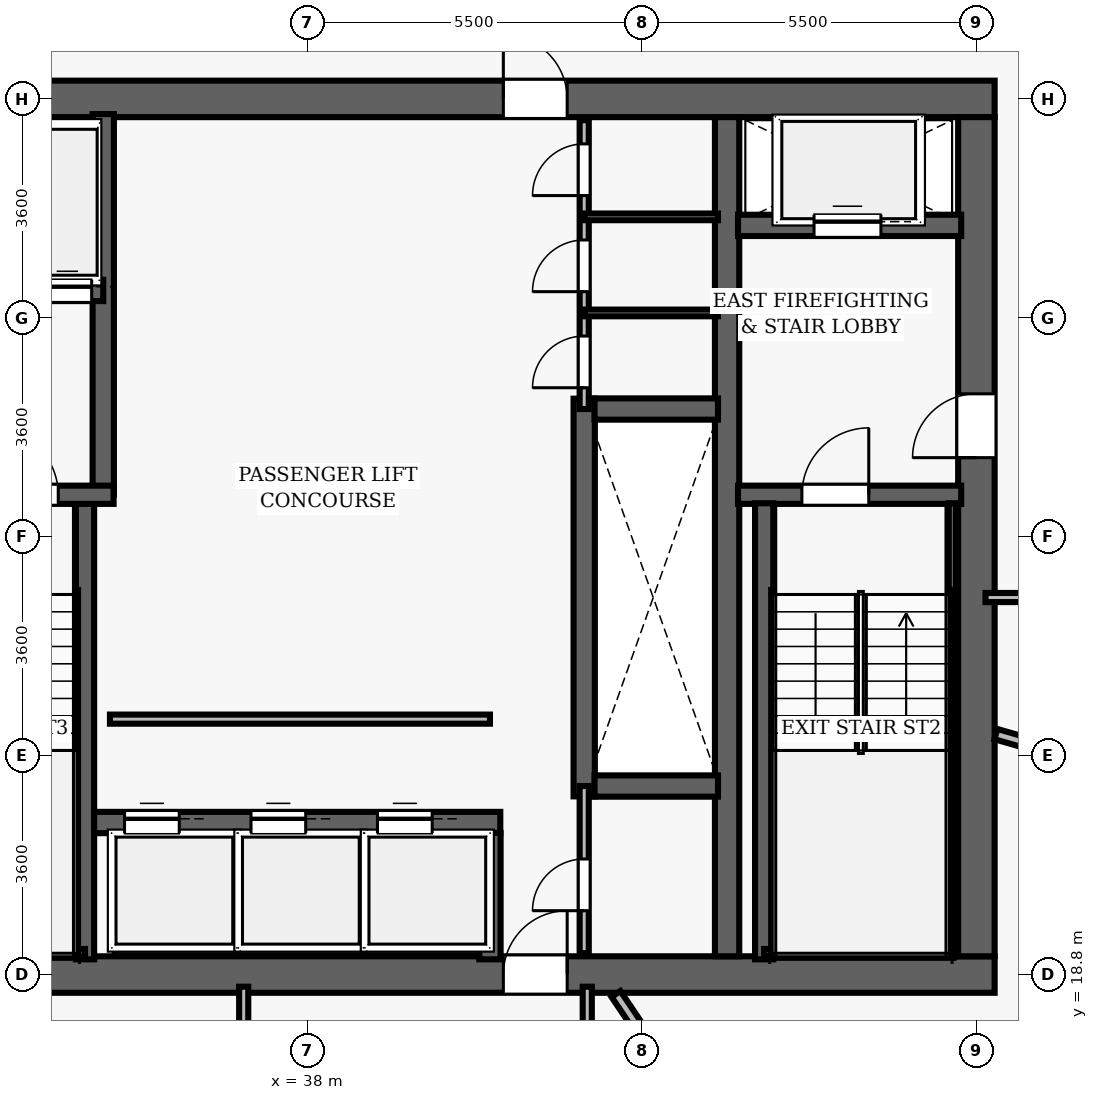
"""IFC4 building model, lengths in metres.
Left out: names, types, materials, properties, quantities, classifications, styles, units other than length and angle.
Written with IfcOpenShell. Run it as: python <this file> out.ifc"""

import sys

from ifc_helpers import new_model, si_unit, direction, frame, frame_2d, origin, place, context, subcontext, project, spatial, rectangle, extrude, element, fill, save


model = new_model("IFC4")
c1 = context("Model", 3, precision=1e-05, world=origin(), true_north=direction((0.0, 1.0)))
c2 = subcontext(c1, "Body", "Model", "MODEL_VIEW")
j1 = project(units=[si_unit("LENGTHUNIT", "METRE"), si_unit("PLANEANGLEUNIT", "RADIAN")], contexts=[c1])
p1 = place(None, origin())
s1 = spatial("IfcSite", under=j1, at=p1, CompositionType="ELEMENT")
p2 = place(p1, origin())
s2 = spatial("IfcBuilding", under=s1, at=p2, CompositionType="ELEMENT")
p3 = place(p2, frame((0.0, 0.0, 141.3)))
s3 = spatial("IfcBuildingStorey", under=s2, at=p3, CompositionType="ELEMENT", Elevation=141.3)
p4 = place(p3, frame((26.7, 18.8, 0.0), z_axis=(0.0, 0.0, 1.0), x_axis=(1.0, 0.0, 0.0)))
e1 = element("IfcWall", 1, at=p4, inside=s3, PredefinedType="SHEAR", context=c2, shape_type="SweptSolid", body=[
    extrude(rectangle(XDim=22.6, YDim=0.6, at=frame_2d((11.3, 0.0))), origin(), (0.0, 0.0, 1.0), 3.5),
])
p5 = place(p4, frame((14.52, 0.0, 0.0)))
e2 = element("IfcOpeningElement", 2, at=p5, cuts=e1, PredefinedType="OPENING", context=c2, shape_type="SweptSolid", body=[
    extrude(rectangle(XDim=1.05, YDim=2.15, at=frame_2d((0.525, 1.075))), frame((0.0, 0.31, 0.0), z_axis=(0.0, -1.0, 0.0), x_axis=(1.0, 0.0, 0.0)), (0.0, 0.0, 1.0), 0.62),
])
p6 = place(p3, frame((26.7, 33.2, 0.0), z_axis=(0.0, 0.0, 1.0), x_axis=(1.0, 0.0, 0.0)))
e3 = element("IfcWall", 3, at=p6, inside=s3, PredefinedType="SHEAR", context=c2, shape_type="SweptSolid", body=[
    extrude(rectangle(XDim=22.6, YDim=0.6, at=frame_2d((11.3, 0.0))), origin(), (0.0, 0.0, 1.0), 3.5),
])
p7 = place(p6, frame((4.62, 0.0, 0.0)))
e4 = element("IfcOpeningElement", 4, at=p7, cuts=e3, PredefinedType="OPENING", context=c2, shape_type="SweptSolid", body=[
    extrude(rectangle(XDim=1.05, YDim=2.15, at=frame_2d((0.525, 1.075))), frame((0.0, 0.31, 0.0), z_axis=(0.0, -1.0, 0.0), x_axis=(1.0, 0.0, 0.0)), (0.0, 0.0, 1.0), 0.62),
])
p8 = place(p6, frame((14.52, 0.0, 0.0)))
e5 = element("IfcOpeningElement", 5, at=p8, cuts=e3, PredefinedType="OPENING", context=c2, shape_type="SweptSolid", body=[
    extrude(rectangle(XDim=1.05, YDim=2.15, at=frame_2d((0.525, 1.075))), frame((0.0, 0.31, 0.0), z_axis=(0.0, -1.0, 0.0), x_axis=(1.0, 0.0, 0.0)), (0.0, 0.0, 1.0), 0.62),
])
p9 = place(p3, frame((49.0, 19.1, 0.0), z_axis=(0.0, 0.0, 1.0), x_axis=(0.0, 1.0, 0.0)))
e6 = element("IfcWall", 6, at=p9, inside=s3, PredefinedType="SHEAR", context=c2, shape_type="SweptSolid", body=[
    extrude(rectangle(XDim=13.8, YDim=0.6, at=frame_2d((6.9, 0.0))), origin(), (0.0, 0.0, 1.0), 3.5),
])
p10 = place(p9, frame((8.2, 0.0, 0.0)))
e7 = element("IfcOpeningElement", 7, at=p10, cuts=e6, PredefinedType="OPENING", context=c2, shape_type="SweptSolid", body=[
    extrude(rectangle(XDim=1.05, YDim=2.15, at=frame_2d((0.525, 1.075))), frame((0.0, 0.31, 0.0), z_axis=(0.0, -1.0, 0.0), x_axis=(1.0, 0.0, 0.0)), (0.0, 0.0, 1.0), 0.62),
])
p11 = place(p3, frame((44.9, 19.1, 0.0), z_axis=(0.0, 0.0, 1.0), x_axis=(0.0, 1.0, 0.0)))
e8 = element("IfcWall", 8, at=p11, inside=s3, PredefinedType="SHEAR", context=c2, shape_type="SweptSolid", body=[
    extrude(rectangle(XDim=13.8, YDim=0.4, at=frame_2d((6.9, 0.0))), origin(), (0.0, 0.0, 1.0), 3.5),
])
p12 = place(p3, frame((45.08, 26.69, 0.0), z_axis=(0.0, 0.0, 1.0), x_axis=(1.0, 0.0, 0.0)))
e9 = element("IfcWall", 9, at=p12, inside=s3, PredefinedType="SHEAR", context=c2, shape_type="SweptSolid", body=[
    extrude(rectangle(XDim=3.67, YDim=0.3, at=frame_2d((1.835, 0.0))), origin(), (0.0, 0.0, 1.0), 3.5),
])
p13 = place(p12, frame((1.05, 0.0, 0.0)))
e10 = element("IfcOpeningElement", 10, at=p13, cuts=e9, PredefinedType="OPENING", context=c2, shape_type="SweptSolid", body=[
    extrude(rectangle(XDim=1.1, YDim=2.15, at=frame_2d((0.55, 1.075))), frame((0.0, 0.16, 0.0), z_axis=(0.0, -1.0, 0.0), x_axis=(1.0, 0.0, 0.0)), (0.0, 0.0, 1.0), 0.32),
])
p14 = place(p3, frame((45.51, 19.05, 0.0), z_axis=(0.0, 0.0, 1.0), x_axis=(0.0, 1.0, 0.0)))
e11 = element("IfcWall", 11, at=p14, inside=s3, PredefinedType="SHEAR", context=c2, shape_type="SweptSolid", body=[
    extrude(rectangle(XDim=7.5, YDim=0.3, at=frame_2d((3.75, 0.0))), origin(), (0.0, 0.0, 1.0), 3.5),
])
p15 = place(p3, frame((48.605, 19.1, 0.0), z_axis=(0.0, 0.0, 1.0), x_axis=(0.0, 1.0, 0.0)))
e12 = element("IfcWall", 12, at=p15, inside=s3, PredefinedType="SHEAR", context=c2, shape_type="SweptSolid", body=[
    extrude(rectangle(XDim=7.45, YDim=0.12, at=frame_2d((3.725, 0.0))), origin(), (0.0, 0.0, 1.0), 3.5),
])
p16 = place(p3, frame((45.51, 19.16, 0.0), z_axis=(0.0, 0.0, 1.0), x_axis=(1.0, 0.0, 0.0)))
e13 = element("IfcWall", 13, at=p16, inside=s3, PredefinedType="SHEAR", context=c2, shape_type="SweptSolid", body=[
    extrude(rectangle(XDim=3.095, YDim=0.12, at=frame_2d((1.547, 0.0))), origin(), (0.0, 0.0, 1.0), 3.5),
])
p17 = place(p3, frame((45.08, 31.12, 0.0), z_axis=(0.0, 0.0, 1.0), x_axis=(1.0, 0.0, 0.0)))
e14 = element("IfcWall", 14, at=p17, inside=s3, PredefinedType="SHEAR", context=c2, shape_type="SweptSolid", body=[
    extrude(rectangle(XDim=3.67, YDim=0.35, at=frame_2d((1.835, 0.0))), origin(), (0.0, 0.0, 1.0), 2.675),
])
p18 = place(p17, frame((1.25, 0.0, 0.0)))
e15 = element("IfcOpeningElement", 15, at=p18, cuts=e14, PredefinedType="OPENING", context=c2, shape_type="SweptSolid", body=[
    extrude(rectangle(XDim=1.1, YDim=2.15, at=frame_2d((0.55, 1.075))), frame((0.0, 0.185, 0.0), z_axis=(0.0, -1.0, 0.0), x_axis=(1.0, 0.0, 0.0)), (0.0, 0.0, 1.0), 0.37),
])
p19 = place(p3, frame((34.34, 19.05, 0.0), z_axis=(0.0, 0.0, 1.0), x_axis=(0.0, 1.0, 0.0)))
e16 = element("IfcWall", 16, at=p19, inside=s3, PredefinedType="SHEAR", context=c2, shape_type="SweptSolid", body=[
    extrude(rectangle(XDim=7.5, YDim=0.3, at=frame_2d((3.75, 0.0))), origin(), (0.0, 0.0, 1.0), 3.5),
])
p20 = place(p3, frame((34.64, 26.69, 0.0), z_axis=(0.0, 0.0, 1.0), x_axis=(0.0, 1.0, 0.0)))
e17 = element("IfcWall", 17, at=p20, inside=s3, PredefinedType="SHEAR", context=c2, shape_type="SweptSolid", body=[
    extrude(rectangle(XDim=6.26, YDim=0.35, at=frame_2d((3.13, 0.0))), origin(), (0.0, 0.0, 1.0), 3.5),
])
p21 = place(p3, frame((31.25, 26.69, 0.0), z_axis=(0.0, 0.0, 1.0), x_axis=(1.0, 0.0, 0.0)))
e18 = element("IfcWall", 18, at=p21, inside=s3, PredefinedType="SHEAR", context=c2, shape_type="SweptSolid", body=[
    extrude(rectangle(XDim=3.56, YDim=0.3, at=frame_2d((1.78, 0.0))), origin(), (0.0, 0.0, 1.0), 3.5),
])
p22 = place(p21, frame((1.55, 0.0, 0.0)))
e19 = element("IfcOpeningElement", 19, at=p22, cuts=e18, PredefinedType="OPENING", context=c2, shape_type="SweptSolid", body=[
    extrude(rectangle(XDim=1.1, YDim=2.15, at=frame_2d((0.55, 1.075))), frame((0.0, 0.16, 0.0), z_axis=(0.0, -1.0, 0.0), x_axis=(1.0, 0.0, 0.0)), (0.0, 0.0, 1.0), 0.32),
])
p23 = place(p3, frame((31.3, 19.16, 0.0), z_axis=(0.0, 0.0, 1.0), x_axis=(1.0, 0.0, 0.0)))
e20 = element("IfcWall", 20, at=p23, inside=s3, PredefinedType="SHEAR", context=c2, shape_type="SweptSolid", body=[
    extrude(rectangle(XDim=3.04, YDim=0.12, at=frame_2d((1.52, 0.0))), origin(), (0.0, 0.0, 1.0), 3.5),
])
p24 = place(p3, frame((32.23, 30.05, 0.0), z_axis=(0.0, 0.0, 1.0), x_axis=(1.0, 0.0, 0.0)))
e21 = element("IfcWall", 21, at=p24, inside=s3, PredefinedType="SHEAR", context=c2, shape_type="SweptSolid", body=[
    extrude(rectangle(XDim=2.41, YDim=0.35, at=frame_2d((1.205, 0.0))), origin(), (0.0, 0.0, 1.0), 2.675),
])
p25 = place(p24, frame((0.42, 0.0, 0.0)))
e22 = element("IfcOpeningElement", 22, at=p25, cuts=e21, PredefinedType="OPENING", context=c2, shape_type="SweptSolid", body=[
    extrude(rectangle(XDim=0.8, YDim=2.15, at=frame_2d((0.4, 1.075))), frame((0.0, 0.185, 0.0), z_axis=(0.0, -1.0, 0.0), x_axis=(1.0, 0.0, 0.0)), (0.0, 0.0, 1.0), 0.37),
])
p26 = place(p24, frame((1.42, 0.0, 0.0)))
e23 = element("IfcOpeningElement", 23, at=p26, cuts=e21, PredefinedType="OPENING", context=c2, shape_type="SweptSolid", body=[
    extrude(rectangle(XDim=0.8, YDim=2.15, at=frame_2d((0.4, 1.075))), frame((0.0, 0.185, 0.0), z_axis=(0.0, -1.0, 0.0), x_axis=(1.0, 0.0, 0.0)), (0.0, 0.0, 1.0), 0.37),
])
p27 = place(p3, frame((42.55, 21.73, 0.0), z_axis=(0.0, 0.0, 1.0), x_axis=(0.0, 1.0, 0.0)))
e24 = element("IfcWall", 24, at=p27, inside=s3, PredefinedType="SHEAR", context=c2, shape_type="SweptSolid", body=[
    extrude(rectangle(XDim=6.54, YDim=0.35, at=frame_2d((3.27, 0.0))), origin(), (0.0, 0.0, 1.0), 2.675),
])
for number, where, z_axis, x_axis in (
    (25, (42.72, 21.9, 0.0), (0.0, 0.0, 1.0), (1.0, 0.0, 0.0)),
    (26, (42.72, 28.1, 0.0), (0.0, 0.0, 1.0), (1.0, 0.0, 0.0)),
):
    element("IfcWall", number, at=place(p3, frame(where, z_axis=z_axis, x_axis=x_axis)), inside=s3, PredefinedType="SHEAR", context=c2, shape_type="SweptSolid", body=[
        extrude(rectangle(XDim=2.03, YDim=0.35, at=frame_2d((1.015, 0.0))), origin(), (0.0, 0.0, 1.0), 2.675),
    ])
p28 = place(p3, frame((34.49, 21.3, 0.0), z_axis=(0.0, 0.0, 1.0), x_axis=(1.0, 0.0, 0.0)))
e27 = element("IfcWall", 27, at=p28, inside=s3, PredefinedType="SHEAR", context=c2, shape_type="SweptSolid", body=[
    extrude(rectangle(XDim=6.68, YDim=0.35, at=frame_2d((3.34, 0.0))), origin(), (0.0, 0.0, 1.0), 2.675),
])
p29 = place(p28, frame((0.5, 0.0, 0.0)))
e28 = element("IfcOpeningElement", 28, at=p29, cuts=e27, PredefinedType="OPENING", context=c2, shape_type="SweptSolid", body=[
    extrude(rectangle(XDim=0.9, YDim=2.15, at=frame_2d((0.45, 1.075))), frame((0.0, 0.185, 0.0), z_axis=(0.0, -1.0, 0.0), x_axis=(1.0, 0.0, 0.0)), (0.0, 0.0, 1.0), 0.37),
])
p30 = place(p28, frame((2.58, 0.0, 0.0)))
e29 = element("IfcOpeningElement", 29, at=p30, cuts=e27, PredefinedType="OPENING", context=c2, shape_type="SweptSolid", body=[
    extrude(rectangle(XDim=0.9, YDim=2.15, at=frame_2d((0.45, 1.075))), frame((0.0, 0.185, 0.0), z_axis=(0.0, -1.0, 0.0), x_axis=(1.0, 0.0, 0.0)), (0.0, 0.0, 1.0), 0.37),
])
p31 = place(p28, frame((4.66, 0.0, 0.0)))
e30 = element("IfcOpeningElement", 30, at=p31, cuts=e27, PredefinedType="OPENING", context=c2, shape_type="SweptSolid", body=[
    extrude(rectangle(XDim=0.9, YDim=2.15, at=frame_2d((0.45, 1.075))), frame((0.0, 0.185, 0.0), z_axis=(0.0, -1.0, 0.0), x_axis=(1.0, 0.0, 0.0)), (0.0, 0.0, 1.0), 0.37),
])
p32 = place(p3, frame((41.0, 19.05, 0.0), z_axis=(0.0, 0.0, 1.0), x_axis=(0.0, 1.0, 0.0)))
e31 = element("IfcWall", 31, at=p32, inside=s3, PredefinedType="SHEAR", context=c2, shape_type="SweptSolid", body=[
    extrude(rectangle(XDim=2.08, YDim=0.35, at=frame_2d((1.04, 0.0))), origin(), (0.0, 0.0, 1.0), 2.675),
])
p33 = place(p3, frame((34.75, 23.0, 0.0), z_axis=(0.0, 0.0, 1.0), x_axis=(1.0, 0.0, 0.0)))
e32 = element("IfcWall", 32, at=p33, inside=s3, PredefinedType="PARTITIONING", context=c2, shape_type="SweptSolid", body=[
    extrude(rectangle(XDim=6.25, YDim=0.15, at=frame_2d((3.125, 0.0))), origin(), (0.0, 0.0, 1.0), 2.675),
])
p34 = place(p3, frame((42.55, 28.1, 0.0), z_axis=(0.0, 0.0, 1.0), x_axis=(0.0, 1.0, 0.0)))
e33 = element("IfcWall", 33, at=p34, inside=s3, PredefinedType="PARTITIONING", context=c2, shape_type="SweptSolid", body=[
    extrude(rectangle(XDim=4.75, YDim=0.15, at=frame_2d((2.375, 0.0))), origin(), (0.0, 0.0, 1.0), 2.675),
])
p35 = place(p34, frame((0.35, 0.0, 0.0)))
e34 = element("IfcOpeningElement", 34, at=p35, cuts=e33, PredefinedType="OPENING", context=c2, shape_type="SweptSolid", body=[
    extrude(rectangle(XDim=0.85, YDim=2.1, at=frame_2d((0.425, 1.05))), frame((0.0, 0.085, 0.0), z_axis=(0.0, -1.0, 0.0), x_axis=(1.0, 0.0, 0.0)), (0.0, 0.0, 1.0), 0.17),
])
p36 = place(p34, frame((1.93, 0.0, 0.0)))
e35 = element("IfcOpeningElement", 35, at=p36, cuts=e33, PredefinedType="OPENING", context=c2, shape_type="SweptSolid", body=[
    extrude(rectangle(XDim=0.85, YDim=2.1, at=frame_2d((0.425, 1.05))), frame((0.0, 0.085, 0.0), z_axis=(0.0, -1.0, 0.0), x_axis=(1.0, 0.0, 0.0)), (0.0, 0.0, 1.0), 0.17),
])
p37 = place(p34, frame((3.51, 0.0, 0.0)))
e36 = element("IfcOpeningElement", 36, at=p37, cuts=e33, PredefinedType="OPENING", context=c2, shape_type="SweptSolid", body=[
    extrude(rectangle(XDim=0.85, YDim=2.1, at=frame_2d((0.425, 1.05))), frame((0.0, 0.085, 0.0), z_axis=(0.0, -1.0, 0.0), x_axis=(1.0, 0.0, 0.0)), (0.0, 0.0, 1.0), 0.17),
])
for number, where, z_axis, x_axis in (
    (37, (42.55, 29.68, 0.0), (0.0, 0.0, 1.0), (1.0, 0.0, 0.0)),
    (38, (42.55, 31.26, 0.0), (0.0, 0.0, 1.0), (1.0, 0.0, 0.0)),
):
    element("IfcWall", number, at=place(p3, frame(where, z_axis=z_axis, x_axis=x_axis)), inside=s3, PredefinedType="PARTITIONING", context=c2, shape_type="SweptSolid", body=[
        extrude(rectangle(XDim=2.2, YDim=0.11, at=frame_2d((1.1, 0.0))), origin(), (0.0, 0.0, 1.0), 2.675),
    ])
p38 = place(p3, frame((42.55, 19.15, 0.0), z_axis=(0.0, 0.0, 1.0), x_axis=(0.0, 1.0, 0.0)))
e39 = element("IfcWall", 39, at=p38, inside=s3, PredefinedType="PARTITIONING", context=c2, shape_type="SweptSolid", body=[
    extrude(rectangle(XDim=2.75, YDim=0.15, at=frame_2d((1.375, 0.0))), origin(), (0.0, 0.0, 1.0), 2.675),
])
p39 = place(p38, frame((0.7, 0.0, 0.0)))
e40 = element("IfcOpeningElement", 40, at=p39, cuts=e39, PredefinedType="OPENING", context=c2, shape_type="SweptSolid", body=[
    extrude(rectangle(XDim=0.85, YDim=2.1, at=frame_2d((0.425, 1.05))), frame((0.0, 0.085, 0.0), z_axis=(0.0, -1.0, 0.0), x_axis=(1.0, 0.0, 0.0)), (0.0, 0.0, 1.0), 0.17),
])
p40 = place(p3, frame((49.15, 25.0, 0.0), z_axis=(0.0, 0.0, 1.0), x_axis=(1.0, 0.0, 0.0)))
e41 = element("IfcWall", 41, at=p40, inside=s3, PredefinedType="PARTITIONING", context=c2, shape_type="SweptSolid", body=[
    extrude(rectangle(XDim=12.35, YDim=0.15, at=frame_2d((6.175, 0.0))), origin(), (0.0, 0.0, 1.0), 2.675),
])
p41 = place(p40, frame((2.337, 0.0, 0.0)))
e42 = element("IfcOpeningElement", 42, at=p41, cuts=e41, PredefinedType="OPENING", context=c2, shape_type="SweptSolid", body=[
    extrude(rectangle(XDim=1.5, YDim=2.2, at=frame_2d((0.75, 1.1))), frame((0.0, 0.085, 0.0), z_axis=(0.0, -1.0, 0.0), x_axis=(1.0, 0.0, 0.0)), (0.0, 0.0, 1.0), 0.17),
])
p42 = place(p3, frame((36.95, 11.2, 0.0), z_axis=(0.0, 0.0, 1.0), x_axis=(0.0, 1.0, 0.0)))
e43 = element("IfcWall", 43, at=p42, inside=s3, PredefinedType="PARTITIONING", context=c2, shape_type="SweptSolid", body=[
    extrude(rectangle(XDim=7.4, YDim=0.15, at=frame_2d((3.7, 0.0))), origin(), (0.0, 0.0, 1.0), 2.675),
])
p43 = place(p42, frame((5.237, 0.0, 0.0)))
e44 = element("IfcOpeningElement", 44, at=p43, cuts=e43, PredefinedType="OPENING", context=c2, shape_type="SweptSolid", body=[
    extrude(rectangle(XDim=1.5, YDim=2.2, at=frame_2d((0.75, 1.1))), frame((0.0, 0.085, 0.0), z_axis=(0.0, -1.0, 0.0), x_axis=(1.0, 0.0, 0.0)), (0.0, 0.0, 1.0), 0.17),
])
p44 = place(p3, frame((42.6, 16.65, 0.0), z_axis=(0.0, 0.0, 1.0), x_axis=(0.0, 1.0, 0.0)))
e45 = element("IfcWall", 45, at=p44, inside=s3, PredefinedType="PARTITIONING", context=c2, shape_type="SweptSolid", body=[
    extrude(rectangle(XDim=1.95, YDim=0.15, at=frame_2d((0.975, 0.0))), origin(), (0.0, 0.0, 1.0), 2.675),
])
p45 = place(p3, frame((43.072, 18.48, 0.0), z_axis=(0.0, 0.0, 1.0), x_axis=(0.559193636848, -0.829037077885, 0.0)))
e46 = element("IfcWall", 46, at=p45, inside=s3, PredefinedType="PARTITIONING", context=c2, shape_type="SweptSolid", body=[
    extrude(rectangle(XDim=18.398, YDim=0.175, at=frame_2d((9.199, 0.0))), origin(), (0.0, 0.0, 1.0), 2.675),
])
p46 = place(p3, frame((49.32, 22.754, 0.0), z_axis=(0.0, 0.0, 1.0), x_axis=(0.961265285636, -0.275624836744, 0.0)))
e47 = element("IfcWall", 47, at=p46, inside=s3, PredefinedType="PARTITIONING", context=c2, shape_type="SweptSolid", body=[
    extrude(rectangle(XDim=18.052, YDim=0.175, at=frame_2d((9.026, 0.0))), origin(), (0.0, 0.0, 1.0), 2.675),
])
p47 = place(p13, origin())
e48 = element("IfcDoor", 48, at=p47, inside=s3, OperationType="SINGLE_SWING_RIGHT", PredefinedType="DOOR", context=c2, shape_type="SweptSolid", body=[
    extrude(rectangle(XDim=1.1, YDim=2.15, at=frame_2d((0.55, 1.075))), frame((0.0, 0.025, 0.0), z_axis=(0.0, -1.0, 0.0), x_axis=(1.0, 0.0, 0.0)), (0.0, 0.0, 1.0), 0.05),
])
fill(e10, e48)
p48 = place(p10, origin())
e49 = element("IfcDoor", 49, at=p48, inside=s3, OperationType="SINGLE_SWING_LEFT", PredefinedType="DOOR", context=c2, shape_type="SweptSolid", body=[
    extrude(rectangle(XDim=1.05, YDim=2.15, at=frame_2d((0.525, 1.075))), frame((0.0, 0.025, 0.0), z_axis=(0.0, -1.0, 0.0), x_axis=(1.0, 0.0, 0.0)), (0.0, 0.0, 1.0), 0.05),
])
fill(e7, e49)
p49 = place(p22, origin())
e50 = element("IfcDoor", 50, at=p49, inside=s3, OperationType="SINGLE_SWING_LEFT", PredefinedType="DOOR", context=c2, shape_type="SweptSolid", body=[
    extrude(rectangle(XDim=1.1, YDim=2.15, at=frame_2d((0.55, 1.075))), frame((0.0, 0.025, 0.0), z_axis=(0.0, -1.0, 0.0), x_axis=(1.0, 0.0, 0.0)), (0.0, 0.0, 1.0), 0.05),
])
fill(e19, e50)
p50 = place(p8, origin())
e51 = element("IfcDoor", 51, at=p50, inside=s3, OperationType="SINGLE_SWING_LEFT", PredefinedType="DOOR", context=c2, shape_type="SweptSolid", body=[
    extrude(rectangle(XDim=1.05, YDim=2.15, at=frame_2d((0.525, 1.075))), frame((0.0, 0.025, 0.0), z_axis=(0.0, -1.0, 0.0), x_axis=(1.0, 0.0, 0.0)), (0.0, 0.0, 1.0), 0.05),
])
fill(e5, e51)
p51 = place(p5, origin())
e52 = element("IfcDoor", 52, at=p51, inside=s3, OperationType="SINGLE_SWING_RIGHT", PredefinedType="DOOR", context=c2, shape_type="SweptSolid", body=[
    extrude(rectangle(XDim=1.05, YDim=2.15, at=frame_2d((0.525, 1.075))), frame((0.0, 0.025, 0.0), z_axis=(0.0, -1.0, 0.0), x_axis=(1.0, 0.0, 0.0)), (0.0, 0.0, 1.0), 0.05),
])
fill(e2, e52)
p52 = place(p35, origin())
e53 = element("IfcDoor", 53, at=p52, inside=s3, OperationType="SINGLE_SWING_LEFT", PredefinedType="DOOR", context=c2, shape_type="SweptSolid", body=[
    extrude(rectangle(XDim=0.85, YDim=2.1, at=frame_2d((0.425, 1.05))), frame((0.0, 0.025, 0.0), z_axis=(0.0, -1.0, 0.0), x_axis=(1.0, 0.0, 0.0)), (0.0, 0.0, 1.0), 0.05),
])
fill(e34, e53)
p53 = place(p36, origin())
e54 = element("IfcDoor", 54, at=p53, inside=s3, OperationType="SINGLE_SWING_LEFT", PredefinedType="DOOR", context=c2, shape_type="SweptSolid", body=[
    extrude(rectangle(XDim=0.85, YDim=2.1, at=frame_2d((0.425, 1.05))), frame((0.0, 0.025, 0.0), z_axis=(0.0, -1.0, 0.0), x_axis=(1.0, 0.0, 0.0)), (0.0, 0.0, 1.0), 0.05),
])
fill(e35, e54)
p54 = place(p37, origin())
e55 = element("IfcDoor", 55, at=p54, inside=s3, OperationType="SINGLE_SWING_LEFT", PredefinedType="DOOR", context=c2, shape_type="SweptSolid", body=[
    extrude(rectangle(XDim=0.85, YDim=2.1, at=frame_2d((0.425, 1.05))), frame((0.0, 0.025, 0.0), z_axis=(0.0, -1.0, 0.0), x_axis=(1.0, 0.0, 0.0)), (0.0, 0.0, 1.0), 0.05),
])
fill(e36, e55)
p55 = place(p39, origin())
e56 = element("IfcDoor", 56, at=p55, inside=s3, OperationType="SINGLE_SWING_LEFT", PredefinedType="DOOR", context=c2, shape_type="SweptSolid", body=[
    extrude(rectangle(XDim=0.85, YDim=2.1, at=frame_2d((0.425, 1.05))), frame((0.0, 0.025, 0.0), z_axis=(0.0, -1.0, 0.0), x_axis=(1.0, 0.0, 0.0)), (0.0, 0.0, 1.0), 0.05),
])
fill(e40, e56)
p56 = place(p29, origin())
e57 = element("IfcDoor", 57, at=p56, inside=s3, OperationType="SLIDING_TO_LEFT", PredefinedType="DOOR", context=c2, shape_type="SweptSolid", body=[
    extrude(rectangle(XDim=0.9, YDim=2.15, at=frame_2d((0.45, 1.075))), frame((0.0, 0.025, 0.0), z_axis=(0.0, -1.0, 0.0), x_axis=(1.0, 0.0, 0.0)), (0.0, 0.0, 1.0), 0.05),
])
fill(e28, e57)
p57 = place(p30, origin())
e58 = element("IfcDoor", 58, at=p57, inside=s3, OperationType="SLIDING_TO_LEFT", PredefinedType="DOOR", context=c2, shape_type="SweptSolid", body=[
    extrude(rectangle(XDim=0.9, YDim=2.15, at=frame_2d((0.45, 1.075))), frame((0.0, 0.025, 0.0), z_axis=(0.0, -1.0, 0.0), x_axis=(1.0, 0.0, 0.0)), (0.0, 0.0, 1.0), 0.05),
])
fill(e29, e58)
p58 = place(p31, origin())
e59 = element("IfcDoor", 59, at=p58, inside=s3, OperationType="SLIDING_TO_LEFT", PredefinedType="DOOR", context=c2, shape_type="SweptSolid", body=[
    extrude(rectangle(XDim=0.9, YDim=2.15, at=frame_2d((0.45, 1.075))), frame((0.0, 0.025, 0.0), z_axis=(0.0, -1.0, 0.0), x_axis=(1.0, 0.0, 0.0)), (0.0, 0.0, 1.0), 0.05),
])
fill(e30, e59)
p59 = place(p18, origin())
e60 = element("IfcDoor", 60, at=p59, inside=s3, OperationType="SLIDING_TO_LEFT", PredefinedType="DOOR", context=c2, shape_type="SweptSolid", body=[
    extrude(rectangle(XDim=1.1, YDim=2.15, at=frame_2d((0.55, 1.075))), frame((0.0, 0.025, 0.0), z_axis=(0.0, -1.0, 0.0), x_axis=(1.0, 0.0, 0.0)), (0.0, 0.0, 1.0), 0.05),
])
fill(e15, e60)
p60 = place(p26, origin())
e61 = element("IfcDoor", 61, at=p60, inside=s3, OperationType="SLIDING_TO_LEFT", PredefinedType="DOOR", context=c2, shape_type="SweptSolid", body=[
    extrude(rectangle(XDim=0.8, YDim=2.15, at=frame_2d((0.4, 1.075))), frame((0.0, 0.025, 0.0), z_axis=(0.0, -1.0, 0.0), x_axis=(1.0, 0.0, 0.0)), (0.0, 0.0, 1.0), 0.05),
])
fill(e23, e61)
save(model, sys.argv[1])
